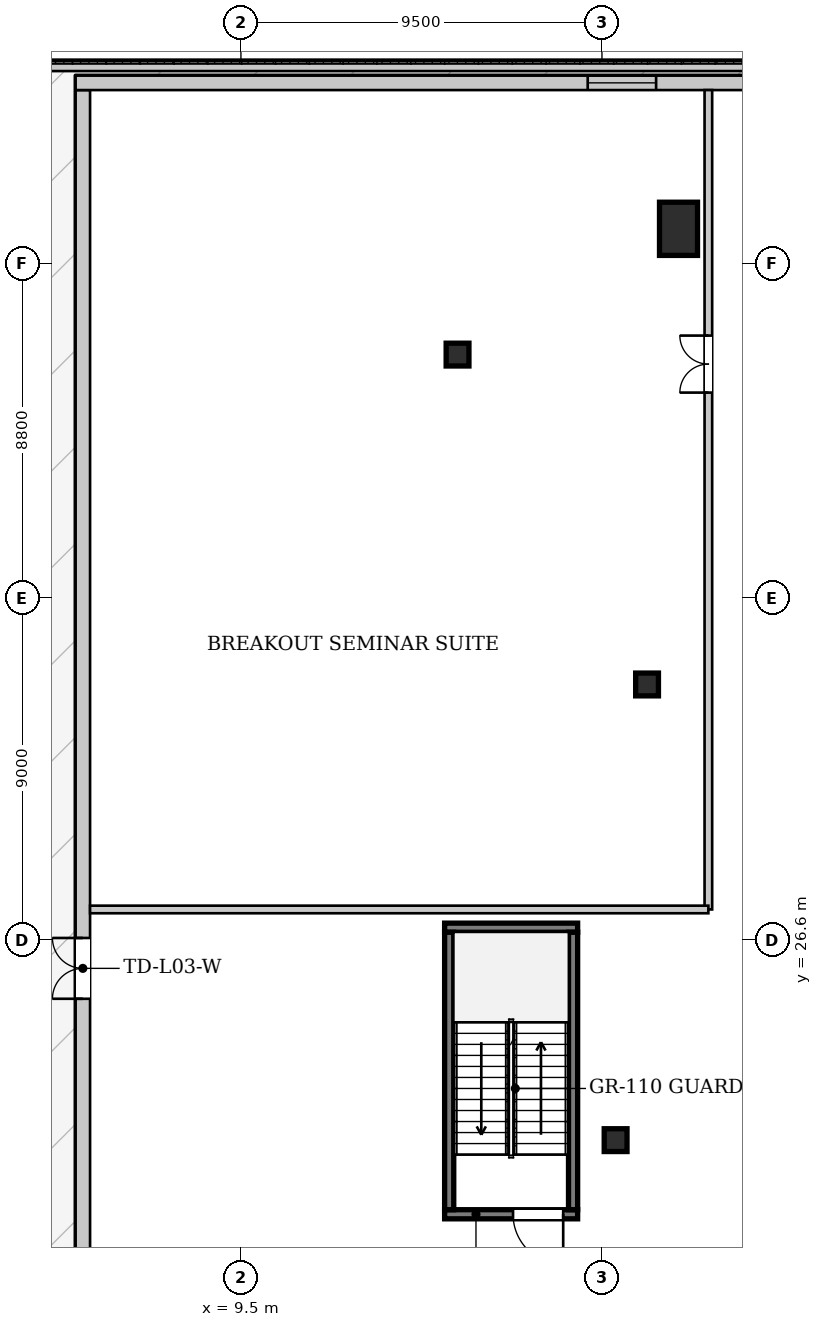
"""IFC4 building model, lengths in metres.
Left out: names, types, materials, properties, quantities, classifications, styles, units other than length and angle.
Written with IfcOpenShell. Run it as: python <this file> out.ifc"""

import sys

from ifc_helpers import new_model, si_unit, direction, frame, frame_2d, origin, origin_2d, place, context, subcontext, project, spatial, rectangle, hollow_rectangle, extrude, source, transform, mapped, element, fill, save


model = new_model("IFC4")
c1 = context("Model", 3, precision=1e-05, world=origin(), true_north=direction((0.0, 1.0)))
c2 = subcontext(c1, "Body", "Model", "MODEL_VIEW")
j1 = project(units=[si_unit("LENGTHUNIT", "METRE"), si_unit("PLANEANGLEUNIT", "RADIAN")], contexts=[c1])
p1 = place(None, origin())
s1 = spatial("IfcSite", under=j1, at=p1, CompositionType="ELEMENT")
p2 = place(p1, origin())
s2 = spatial("IfcBuilding", under=s1, at=p2, CompositionType="ELEMENT")
p3 = place(p2, frame((0.0, 0.0, 15.6)))
s3 = spatial("IfcBuildingStorey", under=s2, at=p3, CompositionType="ELEMENT", Elevation=15.6)
m1 = source(origin(), c2, "Body", "SweptSolid", [
    extrude(rectangle(XDim=1.0, YDim=1.4, at=origin_2d()), origin(), (0.0, 0.0, 1.0), 4.335),
])
p4 = place(p3, frame((21.014, 45.309, 0.0), z_axis=(0.0, 0.0, 1.0), x_axis=(1.0, 0.0, 0.0)))
e1 = element("IfcColumn", 1, at=p4, inside=s3, PredefinedType="COLUMN", context=c2, shape_type="MappedRepresentation", body=[
    mapped(m1, transform((0.0, 0.0, 0.0), x_axis=(1.0, 0.0, 0.0), y_axis=(0.0, 1.0, 0.0), z_axis=(0.0, 0.0, 1.0), scale=1.0)),
])
m2 = source(origin(), c2, "Body", "SweptSolid", [
    extrude(hollow_rectangle(XDim=0.6, YDim=0.6, WallThickness=0.035, at=origin_2d()), origin(), (0.0, 0.0, 1.0), 4.335),
])
for number, where, z_axis, x_axis in (
    (2, (15.2, 42.0, 0.0), (0.0, 0.0, 1.0), (1.0, 0.0, 0.0)),
    (3, (20.187, 33.32, 0.0), (0.0, 0.0, 1.0), (1.0, 0.0, 0.0)),
    (4, (19.359, 21.331, 0.0), (0.0, 0.0, 1.0), (1.0, 0.0, 0.0)),
):
    element("IfcColumn", number, at=place(p3, frame(where, z_axis=z_axis, x_axis=x_axis)), inside=s3, PredefinedType="COLUMN", context=c2, shape_type="MappedRepresentation", body=[
        mapped(m2, transform((0.0, 0.0, 0.0), x_axis=(1.0, 0.0, 0.0), y_axis=(0.0, 1.0, 0.0), z_axis=(0.0, 0.0, 1.0), scale=1.0)),
    ])
p5 = place(p3, frame((5.34, 4.24, 0.0), z_axis=(0.0, 0.0, 1.0), x_axis=(0.0, 1.0, 0.0)))
e5 = element("IfcWall", 5, at=p5, inside=s3, PredefinedType="SOLIDWALL", context=c2, shape_type="SweptSolid", body=[
    extrude(rectangle(XDim=44.72, YDim=0.38, at=frame_2d((22.36, 0.0))), origin(), (0.0, 0.0, 1.0), 3.622),
])
p6 = place(p5, frame((20.81, 0.0, 0.0)))
e6 = element("IfcOpeningElement", 6, at=p6, cuts=e5, PredefinedType="OPENING", context=c2, shape_type="SweptSolid", body=[
    extrude(rectangle(XDim=1.6, YDim=2.3, at=frame_2d((0.8, 1.15))), frame((0.0, 0.2, 0.0), z_axis=(0.0, -1.0, 0.0), x_axis=(1.0, 0.0, 0.0)), (0.0, 0.0, 1.0), 0.4),
])
p7 = place(p3, frame((5.15, 49.15, 0.0), z_axis=(0.0, 0.0, 1.0), x_axis=(1.0, 0.0, 0.0)))
e7 = element("IfcWall", 7, at=p7, inside=s3, PredefinedType="SOLIDWALL", context=c2, shape_type="SweptSolid", body=[
    extrude(rectangle(XDim=29.65, YDim=0.38, at=frame_2d((14.825, 0.0))), origin(), (0.0, 0.0, 1.0), 3.622),
])
p8 = place(p7, frame((13.475, 0.0, 0.85)))
e8 = element("IfcOpeningElement", 8, at=p8, cuts=e7, PredefinedType="OPENING", context=c2, shape_type="SweptSolid", body=[
    extrude(rectangle(XDim=1.8, YDim=2.4, at=frame_2d((0.9, 1.2))), frame((0.0, 0.2, 0.0), z_axis=(0.0, -1.0, 0.0), x_axis=(1.0, 0.0, 0.0)), (0.0, 0.0, 1.0), 0.4),
])
p9 = place(p3, frame((4.3, 49.6, 0.0), z_axis=(0.0, 0.0, 1.0), x_axis=(1.0, 0.0, 0.0)))
e9 = element("IfcWall", 9, at=p9, inside=s3, PredefinedType="PARAPET", context=c2, shape_type="SweptSolid", body=[
    extrude(rectangle(XDim=67.4, YDim=0.28, at=frame_2d((33.7, 0.0))), origin(), (0.0, 0.0, 1.0), 0.45),
])
p10 = place(p3, frame((18.36, 19.38, 0.0), z_axis=(0.0, 0.0, 1.0), x_axis=(-1.0, 0.0, 0.0)))
e10 = element("IfcWall", 10, at=p10, inside=s3, PredefinedType="PARTITIONING", context=c2, shape_type="SweptSolid", body=[
    extrude(rectangle(XDim=3.5, YDim=0.24, at=frame_2d((1.75, 0.0))), origin(), (0.0, 0.0, 1.0), 4.18),
])
p11 = place(p10, frame((0.38, 0.0, 0.0)))
e11 = element("IfcOpeningElement", 11, at=p11, cuts=e10, PredefinedType="OPENING", context=c2, shape_type="SweptSolid", body=[
    extrude(rectangle(XDim=1.32, YDim=2.2, at=frame_2d((0.66, 1.1))), frame((0.0, 0.13, 0.0), z_axis=(0.0, -1.0, 0.0), x_axis=(1.0, 0.0, 0.0)), (0.0, 0.0, 1.0), 0.26),
])
p12 = place(p3, frame((14.86, 26.92, 0.0), z_axis=(0.0, 0.0, 1.0), x_axis=(1.0, 0.0, 0.0)))
e12 = element("IfcWall", 12, at=p12, inside=s3, PredefinedType="PARTITIONING", context=c2, shape_type="SweptSolid", body=[
    extrude(rectangle(XDim=3.5, YDim=0.24, at=frame_2d((1.75, 0.0))), origin(), (0.0, 0.0, 1.0), 4.18),
])
for number, where, z_axis, x_axis in (
    (13, (14.98, 19.5, 0.0), (0.0, 0.0, 1.0), (0.0, 1.0, 0.0)),
    (14, (18.24, 26.8, 0.0), (0.0, 0.0, 1.0), (0.0, -1.0, 0.0)),
):
    element("IfcWall", number, at=place(p3, frame(where, z_axis=z_axis, x_axis=x_axis)), inside=s3, PredefinedType="PARTITIONING", context=c2, shape_type="SweptSolid", body=[
        extrude(rectangle(XDim=7.3, YDim=0.24, at=frame_2d((3.65, 0.0))), origin(), (0.0, 0.0, 1.0), 4.18),
    ])
p13 = place(p3, frame((21.8, 27.4, 0.0), z_axis=(0.0, 0.0, 1.0), x_axis=(0.0, 1.0, 0.0)))
e15 = element("IfcWall", 15, at=p13, inside=s3, PredefinedType="PARTITIONING", context=c2, shape_type="SweptSolid", body=[
    extrude(rectangle(XDim=21.56, YDim=0.2, at=frame_2d((10.78, 0.0))), origin(), (0.0, 0.0, 1.0), 3.53),
])
p14 = place(p13, frame((13.6, 0.0, 0.0)))
e16 = element("IfcOpeningElement", 16, at=p14, cuts=e15, PredefinedType="OPENING", context=c2, shape_type="SweptSolid", body=[
    extrude(rectangle(XDim=1.5, YDim=2.25, at=frame_2d((0.75, 1.125))), frame((0.0, 0.11, 0.0), z_axis=(0.0, -1.0, 0.0), x_axis=(1.0, 0.0, 0.0)), (0.0, 0.0, 1.0), 0.22),
])
p15 = place(p3, frame((5.53, 27.4, 0.0), z_axis=(0.0, 0.0, 1.0), x_axis=(1.0, 0.0, 0.0)))
e17 = element("IfcWall", 17, at=p15, inside=s3, PredefinedType="PARTITIONING", context=c2, shape_type="SweptSolid", body=[
    extrude(rectangle(XDim=16.27, YDim=0.2, at=frame_2d((8.135, 0.0))), origin(), (0.0, 0.0, 1.0), 3.53),
])
m3 = source(origin(), c2, "Body", "SweptSolid", [
    extrude(rectangle(XDim=1.6, YDim=2.3, at=frame_2d((0.8, 1.15))), frame((0.0, 0.025, 0.0), z_axis=(0.0, -1.0, 0.0), x_axis=(1.0, 0.0, 0.0)), (0.0, 0.0, 1.0), 0.05),
])
p16 = place(p6, origin())
e18 = element("IfcDoor", 18, at=p16, inside=s3, OperationType="DOUBLE_DOOR_SINGLE_SWING", PredefinedType="DOOR", context=c2, shape_type="MappedRepresentation", body=[
    mapped(m3, transform((0.0, 0.0, 0.0), x_axis=(1.0, 0.0, 0.0), y_axis=(0.0, 1.0, 0.0), z_axis=(0.0, 0.0, 1.0), scale=1.0)),
])
fill(e6, e18)
m4 = source(origin(), c2, "Body", "SweptSolid", [
    extrude(rectangle(XDim=1.8, YDim=2.4, at=frame_2d((0.9, 1.2))), frame((0.0, 0.03, 0.0), z_axis=(0.0, -1.0, 0.0), x_axis=(1.0, 0.0, 0.0)), (0.0, 0.0, 1.0), 0.06),
])
p17 = place(p8, origin())
e19 = element("IfcWindow", 19, at=p17, inside=s3, PartitioningType="SINGLE_PANEL", PredefinedType="WINDOW", context=c2, shape_type="MappedRepresentation", body=[
    mapped(m4, transform((0.0, 0.0, 0.0), x_axis=(1.0, 0.0, 0.0), y_axis=(0.0, 1.0, 0.0), z_axis=(0.0, 0.0, 1.0), scale=1.0)),
])
fill(e8, e19)
m5 = source(origin(), c2, "Body", "SweptSolid", [
    extrude(rectangle(XDim=1.32, YDim=2.2, at=frame_2d((0.66, 1.1))), frame((0.0, 0.025, 0.0), z_axis=(0.0, -1.0, 0.0), x_axis=(1.0, 0.0, 0.0)), (0.0, 0.0, 1.0), 0.05),
])
p18 = place(p11, origin())
e20 = element("IfcDoor", 20, at=p18, inside=s3, OperationType="SINGLE_SWING_LEFT", PredefinedType="DOOR", context=c2, shape_type="MappedRepresentation", body=[
    mapped(m5, transform((0.0, 0.0, 0.0), x_axis=(1.0, 0.0, 0.0), y_axis=(0.0, 1.0, 0.0), z_axis=(0.0, 0.0, 1.0), scale=1.0)),
])
fill(e11, e20)
m6 = source(origin(), c2, "Body", "SweptSolid", [
    extrude(rectangle(XDim=1.5, YDim=2.25, at=frame_2d((0.75, 1.125))), frame((0.0, 0.025, 0.0), z_axis=(0.0, -1.0, 0.0), x_axis=(1.0, 0.0, 0.0)), (0.0, 0.0, 1.0), 0.05),
])
p19 = place(p14, origin())
e21 = element("IfcDoor", 21, at=p19, inside=s3, OperationType="DOUBLE_DOOR_SINGLE_SWING", PredefinedType="DOOR", context=c2, shape_type="MappedRepresentation", body=[
    mapped(m6, transform((0.0, 0.0, 0.0), x_axis=(1.0, 0.0, 0.0), y_axis=(0.0, 1.0, 0.0), z_axis=(0.0, 0.0, 1.0), scale=1.0)),
])
fill(e16, e21)
save(model, sys.argv[1])
